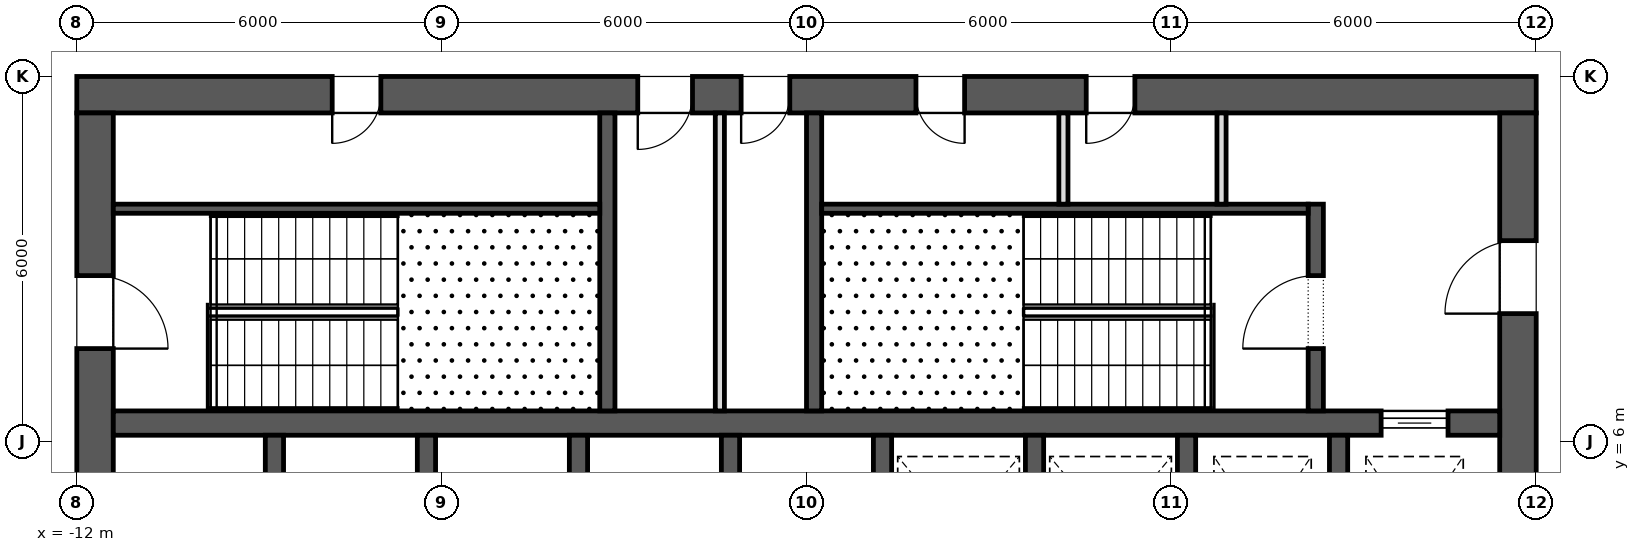
"""IFC4 building model, lengths in metres.
Left out: names, types, materials, properties, quantities, classifications, styles, units other than length and angle.
Written with IfcOpenShell. Run it as: python <this file> out.ifc"""

import sys

from ifc_helpers import new_model, si_unit, direction, frame, frame_2d, origin, place, context, subcontext, project, spatial, rectangle, extrude, element, fill, save


model = new_model("IFC4")
c1 = context("Model", 3, precision=1e-05, world=origin(), true_north=direction((0.0, 1.0)))
c2 = subcontext(c1, "Body", "Model", "MODEL_VIEW")
j1 = project(units=[si_unit("LENGTHUNIT", "METRE"), si_unit("PLANEANGLEUNIT", "RADIAN")], contexts=[c1])
p1 = place(None, origin())
s1 = spatial("IfcSite", under=j1, at=p1, CompositionType="ELEMENT")
p2 = place(p1, origin())
s2 = spatial("IfcBuilding", under=s1, at=p2, CompositionType="ELEMENT")
p3 = place(p2, frame((0.0, 0.0, 69.7)))
s3 = spatial("IfcBuildingStorey", under=s2, at=p3, CompositionType="ELEMENT", Elevation=69.7)
p4 = place(p3, frame((-12.0, 11.7, 0.0), z_axis=(0.0, 0.0, 1.0), x_axis=(1.0, 0.0, 0.0)))
e1 = element("IfcWall", 1, at=p4, inside=s3, PredefinedType="SHEAR", context=c2, shape_type="SweptSolid", body=[
    extrude(rectangle(XDim=24.0, YDim=0.6, at=frame_2d((12.0, 0.0))), origin(), (0.0, 0.0, 1.0), 4.2),
])
p5 = place(p4, frame((9.225, 0.0, 0.0)))
e2 = element("IfcOpeningElement", 2, at=p5, cuts=e1, PredefinedType="OPENING", context=c2, shape_type="SweptSolid", body=[
    extrude(rectangle(XDim=0.9, YDim=2.1, at=frame_2d((0.45, 1.05))), frame((0.0, 0.312, 0.0), z_axis=(0.0, -1.0, 0.0), x_axis=(1.0, 0.0, 0.0)), (0.0, 0.0, 1.0), 0.624),
])
p6 = place(p4, frame((10.925, 0.0, 0.0)))
e3 = element("IfcOpeningElement", 3, at=p6, cuts=e1, PredefinedType="OPENING", context=c2, shape_type="SweptSolid", body=[
    extrude(rectangle(XDim=0.8, YDim=2.1, at=frame_2d((0.4, 1.05))), frame((0.0, 0.312, 0.0), z_axis=(0.0, -1.0, 0.0), x_axis=(1.0, 0.0, 0.0)), (0.0, 0.0, 1.0), 0.624),
])
p7 = place(p4, frame((4.2, 0.0, 0.0)))
e4 = element("IfcOpeningElement", 4, at=p7, cuts=e1, PredefinedType="OPENING", context=c2, shape_type="SweptSolid", body=[
    extrude(rectangle(XDim=0.8, YDim=2.1, at=frame_2d((0.4, 1.05))), frame((0.0, 0.312, 0.0), z_axis=(0.0, -1.0, 0.0), x_axis=(1.0, 0.0, 0.0)), (0.0, 0.0, 1.0), 0.624),
])
p8 = place(p4, frame((13.8, 0.0, 0.0)))
e5 = element("IfcOpeningElement", 5, at=p8, cuts=e1, PredefinedType="OPENING", context=c2, shape_type="SweptSolid", body=[
    extrude(rectangle(XDim=0.8, YDim=2.1, at=frame_2d((0.4, 1.05))), frame((0.0, 0.312, 0.0), z_axis=(0.0, -1.0, 0.0), x_axis=(1.0, 0.0, 0.0)), (0.0, 0.0, 1.0), 0.624),
])
p9 = place(p4, frame((16.6, 0.0, 0.0)))
e6 = element("IfcOpeningElement", 6, at=p9, cuts=e1, PredefinedType="OPENING", context=c2, shape_type="SweptSolid", body=[
    extrude(rectangle(XDim=0.8, YDim=2.1, at=frame_2d((0.4, 1.05))), frame((0.0, 0.312, 0.0), z_axis=(0.0, -1.0, 0.0), x_axis=(1.0, 0.0, 0.0)), (0.0, 0.0, 1.0), 0.624),
])
p10 = place(p3, frame((11.7, -11.4, 0.0), z_axis=(0.0, 0.0, 1.0), x_axis=(0.0, 1.0, 0.0)))
e7 = element("IfcWall", 7, at=p10, inside=s3, PredefinedType="SHEAR", context=c2, shape_type="SweptSolid", body=[
    extrude(rectangle(XDim=22.8, YDim=0.6, at=frame_2d((11.4, 0.0))), origin(), (0.0, 0.0, 1.0), 4.2),
])
p11 = place(p10, frame((10.2, 0.0, 0.0)))
e8 = element("IfcOpeningElement", 8, at=p11, cuts=e7, PredefinedType="OPENING", context=c2, shape_type="SweptSolid", body=[
    extrude(rectangle(XDim=2.4, YDim=2.1, at=frame_2d((1.2, 1.05))), frame((0.0, 0.312, 0.0), z_axis=(0.0, -1.0, 0.0), x_axis=(1.0, 0.0, 0.0)), (0.0, 0.0, 1.0), 0.624),
])
p12 = place(p10, frame((19.5, 0.0, 0.0)))
e9 = element("IfcOpeningElement", 9, at=p12, cuts=e7, PredefinedType="OPENING", context=c2, shape_type="SweptSolid", body=[
    extrude(rectangle(XDim=1.2, YDim=2.1, at=frame_2d((0.6, 1.05))), frame((0.0, 0.312, 0.0), z_axis=(0.0, -1.0, 0.0), x_axis=(1.0, 0.0, 0.0)), (0.0, 0.0, 1.0), 0.624),
])
p13 = place(p10, frame((2.1, 0.0, 0.0)))
e10 = element("IfcOpeningElement", 10, at=p13, cuts=e7, PredefinedType="OPENING", context=c2, shape_type="SweptSolid", body=[
    extrude(rectangle(XDim=1.2, YDim=2.1, at=frame_2d((0.6, 1.05))), frame((0.0, 0.312, 0.0), z_axis=(0.0, -1.0, 0.0), x_axis=(1.0, 0.0, 0.0)), (0.0, 0.0, 1.0), 0.624),
])
p14 = place(p3, frame((-11.7, -11.4, 0.0), z_axis=(0.0, 0.0, 1.0), x_axis=(0.0, 1.0, 0.0)))
e11 = element("IfcWall", 11, at=p14, inside=s3, PredefinedType="SHEAR", context=c2, shape_type="SweptSolid", body=[
    extrude(rectangle(XDim=22.8, YDim=0.6, at=frame_2d((11.4, 0.0))), origin(), (0.0, 0.0, 1.0), 4.2),
])
p15 = place(p14, frame((10.2, 0.0, 0.0)))
e12 = element("IfcOpeningElement", 12, at=p15, cuts=e11, PredefinedType="OPENING", context=c2, shape_type="SweptSolid", body=[
    extrude(rectangle(XDim=2.4, YDim=2.1, at=frame_2d((1.2, 1.05))), frame((0.0, 0.312, 0.0), z_axis=(0.0, -1.0, 0.0), x_axis=(1.0, 0.0, 0.0)), (0.0, 0.0, 1.0), 0.624),
])
p16 = place(p14, frame((18.925, 0.0, 0.0)))
e13 = element("IfcOpeningElement", 13, at=p16, cuts=e11, PredefinedType="OPENING", context=c2, shape_type="SweptSolid", body=[
    extrude(rectangle(XDim=1.2, YDim=2.1, at=frame_2d((0.6, 1.05))), frame((0.0, 0.312, 0.0), z_axis=(0.0, -1.0, 0.0), x_axis=(1.0, 0.0, 0.0)), (0.0, 0.0, 1.0), 0.624),
])
p17 = place(p14, frame((2.675, 0.0, 0.0)))
e14 = element("IfcOpeningElement", 14, at=p17, cuts=e11, PredefinedType="OPENING", context=c2, shape_type="SweptSolid", body=[
    extrude(rectangle(XDim=1.2, YDim=2.1, at=frame_2d((0.6, 1.05))), frame((0.0, 0.312, 0.0), z_axis=(0.0, -1.0, 0.0), x_axis=(1.0, 0.0, 0.0)), (0.0, 0.0, 1.0), 0.624),
])
p18 = place(p3, frame((-11.4, 6.3, 0.0), z_axis=(0.0, 0.0, 1.0), x_axis=(1.0, 0.0, 0.0)))
e15 = element("IfcWall", 15, at=p18, inside=s3, PredefinedType="SHEAR", context=c2, shape_type="SweptSolid", body=[
    extrude(rectangle(XDim=22.8, YDim=0.4, at=frame_2d((11.4, 0.0))), origin(), (0.0, 0.0, 1.0), 4.2),
])
p19 = place(p18, frame((20.85, 0.0, 0.0)))
e16 = element("IfcOpeningElement", 16, at=p19, cuts=e15, PredefinedType="OPENING", context=c2, shape_type="SweptSolid", body=[
    extrude(rectangle(XDim=1.1, YDim=2.1, at=frame_2d((0.55, 1.05))), frame((0.0, 0.212, 0.0), z_axis=(0.0, -1.0, 0.0), x_axis=(1.0, 0.0, 0.0)), (0.0, 0.0, 1.0), 0.424),
])
for number, where, z_axis, x_axis in (
    (17, (-8.75, 3.2, 0.0), (0.0, 0.0, 1.0), (0.0, 1.0, 0.0)),
    (18, (-6.25, 3.2, 0.0), (0.0, 0.0, 1.0), (0.0, 1.0, 0.0)),
    (19, (-3.75, 3.2, 0.0), (0.0, 0.0, 1.0), (0.0, 1.0, 0.0)),
    (20, (-1.25, 3.2, 0.0), (0.0, 0.0, 1.0), (0.0, 1.0, 0.0)),
    (21, (1.25, 3.2, 0.0), (0.0, 0.0, 1.0), (0.0, 1.0, 0.0)),
    (22, (3.75, 3.2, 0.0), (0.0, 0.0, 1.0), (0.0, 1.0, 0.0)),
    (23, (6.25, 3.2, 0.0), (0.0, 0.0, 1.0), (0.0, 1.0, 0.0)),
    (24, (8.75, 3.2, 0.0), (0.0, 0.0, 1.0), (0.0, 1.0, 0.0)),
):
    element("IfcWall", number, at=place(p3, frame(where, z_axis=z_axis, x_axis=x_axis)), inside=s3, PredefinedType="SHEAR", context=c2, shape_type="SweptSolid", body=[
        extrude(rectangle(XDim=2.9, YDim=0.3, at=frame_2d((1.45, 0.0))), origin(), (0.0, 0.0, 1.0), 4.2),
    ])
for number, where, z_axis, x_axis in (
    (25, (-3.275, 6.5, 0.0), (0.0, 0.0, 1.0), (0.0, 1.0, 0.0)),
    (26, (0.125, 6.5, 0.0), (0.0, 0.0, 1.0), (0.0, 1.0, 0.0)),
):
    element("IfcWall", number, at=place(p3, frame(where, z_axis=z_axis, x_axis=x_axis)), inside=s3, PredefinedType="SHEAR", context=c2, shape_type="SweptSolid", body=[
        extrude(rectangle(XDim=4.9, YDim=0.25, at=frame_2d((2.45, 0.0))), origin(), (0.0, 0.0, 1.0), 3.9),
    ])
p20 = place(p3, frame((8.375, 6.5, 0.0), z_axis=(0.0, 0.0, 1.0), x_axis=(0.0, 1.0, 0.0)))
e27 = element("IfcWall", 27, at=p20, inside=s3, PredefinedType="SHEAR", context=c2, shape_type="SweptSolid", body=[
    extrude(rectangle(XDim=3.4, YDim=0.25, at=frame_2d((1.7, 0.0))), origin(), (0.0, 0.0, 1.0), 3.9),
])
p21 = place(p20, frame((1.025, 0.0, 0.0)))
e28 = element("IfcOpeningElement", 28, at=p21, cuts=e27, PredefinedType="OPENING", context=c2, shape_type="SweptSolid", body=[
    extrude(rectangle(XDim=1.2, YDim=2.1, at=frame_2d((0.6, 1.05))), frame((0.0, 0.137, 0.0), z_axis=(0.0, -1.0, 0.0), x_axis=(1.0, 0.0, 0.0)), (0.0, 0.0, 1.0), 0.274),
])
for number, where, z_axis, x_axis in (
    (29, (-11.4, 9.825, 0.0), (0.0, 0.0, 1.0), (1.0, 0.0, 0.0)),
    (30, (0.25, 9.825, 0.0), (0.0, 0.0, 1.0), (1.0, 0.0, 0.0)),
):
    element("IfcWall", number, at=place(p3, frame(where, z_axis=z_axis, x_axis=x_axis)), inside=s3, PredefinedType="SHEAR", context=c2, shape_type="SweptSolid", body=[
        extrude(rectangle(XDim=8.0, YDim=0.15, at=frame_2d((4.0, 0.0))), origin(), (0.0, 0.0, 1.0), 3.9),
    ])
p22 = place(p3, frame((-1.425, 6.5, 0.0), z_axis=(0.0, 0.0, 1.0), x_axis=(0.0, 1.0, 0.0)))
e31 = element("IfcWall", 31, at=p22, inside=s3, PredefinedType="PARTITIONING", context=c2, shape_type="SweptSolid", body=[
    extrude(rectangle(XDim=4.9, YDim=0.15, at=frame_2d((2.45, 0.0))), origin(), (0.0, 0.0, 1.0), 3.9),
])
for number, where, z_axis, x_axis in (
    (32, (4.225, 9.9, 0.0), (0.0, 0.0, 1.0), (0.0, 1.0, 0.0)),
    (33, (6.825, 9.9, 0.0), (0.0, 0.0, 1.0), (0.0, 1.0, 0.0)),
):
    element("IfcWall", number, at=place(p3, frame(where, z_axis=z_axis, x_axis=x_axis)), inside=s3, PredefinedType="PARTITIONING", context=c2, shape_type="SweptSolid", body=[
        extrude(rectangle(XDim=1.5, YDim=0.15, at=frame_2d((0.75, 0.0))), origin(), (0.0, 0.0, 1.0), 3.9),
    ])
p23 = place(p19, origin())
e34 = element("IfcDoor", 34, at=p23, inside=s3, OperationType="SLIDING_TO_LEFT", PredefinedType="DOOR", context=c2, shape_type="SweptSolid", body=[
    extrude(rectangle(XDim=1.1, YDim=2.1, at=frame_2d((0.55, 1.05))), frame((0.0, 0.025, 0.0), z_axis=(0.0, -1.0, 0.0), x_axis=(1.0, 0.0, 0.0)), (0.0, 0.0, 1.0), 0.05),
])
fill(e16, e34)
p24 = place(p16, frame((1.2, 0.0, 0.0), z_axis=(0.0, 0.0, 1.0), x_axis=(-1.0, 0.0, 0.0)))
e35 = element("IfcDoor", 35, at=p24, inside=s3, OperationType="SINGLE_SWING_LEFT", PredefinedType="DOOR", context=c2, shape_type="SweptSolid", body=[
    extrude(rectangle(XDim=1.2, YDim=2.1, at=frame_2d((0.6, 1.05))), frame((0.0, 0.025, 0.0), z_axis=(0.0, -1.0, 0.0), x_axis=(1.0, 0.0, 0.0)), (0.0, 0.0, 1.0), 0.05),
])
fill(e13, e35)
p25 = place(p21, origin())
e36 = element("IfcDoor", 36, at=p25, inside=s3, OperationType="SINGLE_SWING_RIGHT", PredefinedType="DOOR", context=c2, shape_type="SweptSolid", body=[
    extrude(rectangle(XDim=1.2, YDim=2.1, at=frame_2d((0.6, 1.05))), frame((0.0, 0.025, 0.0), z_axis=(0.0, -1.0, 0.0), x_axis=(1.0, 0.0, 0.0)), (0.0, 0.0, 1.0), 0.05),
])
fill(e28, e36)
p26 = place(p12, origin())
e37 = element("IfcDoor", 37, at=p26, inside=s3, OperationType="SINGLE_SWING_RIGHT", PredefinedType="DOOR", context=c2, shape_type="SweptSolid", body=[
    extrude(rectangle(XDim=1.2, YDim=2.1, at=frame_2d((0.6, 1.05))), frame((0.0, 0.025, 0.0), z_axis=(0.0, -1.0, 0.0), x_axis=(1.0, 0.0, 0.0)), (0.0, 0.0, 1.0), 0.05),
])
fill(e9, e37)
p27 = place(p5, frame((0.9, 0.0, 0.0), z_axis=(0.0, 0.0, 1.0), x_axis=(-1.0, 0.0, 0.0)))
e38 = element("IfcDoor", 38, at=p27, inside=s3, OperationType="SINGLE_SWING_LEFT", PredefinedType="DOOR", context=c2, shape_type="SweptSolid", body=[
    extrude(rectangle(XDim=0.9, YDim=2.1, at=frame_2d((0.45, 1.05))), frame((0.0, 0.025, 0.0), z_axis=(0.0, -1.0, 0.0), x_axis=(1.0, 0.0, 0.0)), (0.0, 0.0, 1.0), 0.05),
])
fill(e2, e38)
p28 = place(p6, frame((0.8, 0.0, 0.0), z_axis=(0.0, 0.0, 1.0), x_axis=(-1.0, 0.0, 0.0)))
e39 = element("IfcDoor", 39, at=p28, inside=s3, OperationType="SINGLE_SWING_LEFT", PredefinedType="DOOR", context=c2, shape_type="SweptSolid", body=[
    extrude(rectangle(XDim=0.8, YDim=2.1, at=frame_2d((0.4, 1.05))), frame((0.0, 0.025, 0.0), z_axis=(0.0, -1.0, 0.0), x_axis=(1.0, 0.0, 0.0)), (0.0, 0.0, 1.0), 0.05),
])
fill(e3, e39)
p29 = place(p7, frame((0.8, 0.0, 0.0), z_axis=(0.0, 0.0, 1.0), x_axis=(-1.0, 0.0, 0.0)))
e40 = element("IfcDoor", 40, at=p29, inside=s3, OperationType="SINGLE_SWING_LEFT", PredefinedType="DOOR", context=c2, shape_type="SweptSolid", body=[
    extrude(rectangle(XDim=0.8, YDim=2.1, at=frame_2d((0.4, 1.05))), frame((0.0, 0.025, 0.0), z_axis=(0.0, -1.0, 0.0), x_axis=(1.0, 0.0, 0.0)), (0.0, 0.0, 1.0), 0.05),
])
fill(e4, e40)
p30 = place(p8, frame((0.8, 0.0, 0.0), z_axis=(0.0, 0.0, 1.0), x_axis=(-1.0, 0.0, 0.0)))
e41 = element("IfcDoor", 41, at=p30, inside=s3, OperationType="SINGLE_SWING_RIGHT", PredefinedType="DOOR", context=c2, shape_type="SweptSolid", body=[
    extrude(rectangle(XDim=0.8, YDim=2.1, at=frame_2d((0.4, 1.05))), frame((0.0, 0.025, 0.0), z_axis=(0.0, -1.0, 0.0), x_axis=(1.0, 0.0, 0.0)), (0.0, 0.0, 1.0), 0.05),
])
fill(e5, e41)
p31 = place(p9, frame((0.8, 0.0, 0.0), z_axis=(0.0, 0.0, 1.0), x_axis=(-1.0, 0.0, 0.0)))
e42 = element("IfcDoor", 42, at=p31, inside=s3, OperationType="SINGLE_SWING_LEFT", PredefinedType="DOOR", context=c2, shape_type="SweptSolid", body=[
    extrude(rectangle(XDim=0.8, YDim=2.1, at=frame_2d((0.4, 1.05))), frame((0.0, 0.025, 0.0), z_axis=(0.0, -1.0, 0.0), x_axis=(1.0, 0.0, 0.0)), (0.0, 0.0, 1.0), 0.05),
])
fill(e6, e42)
save(model, sys.argv[1])
